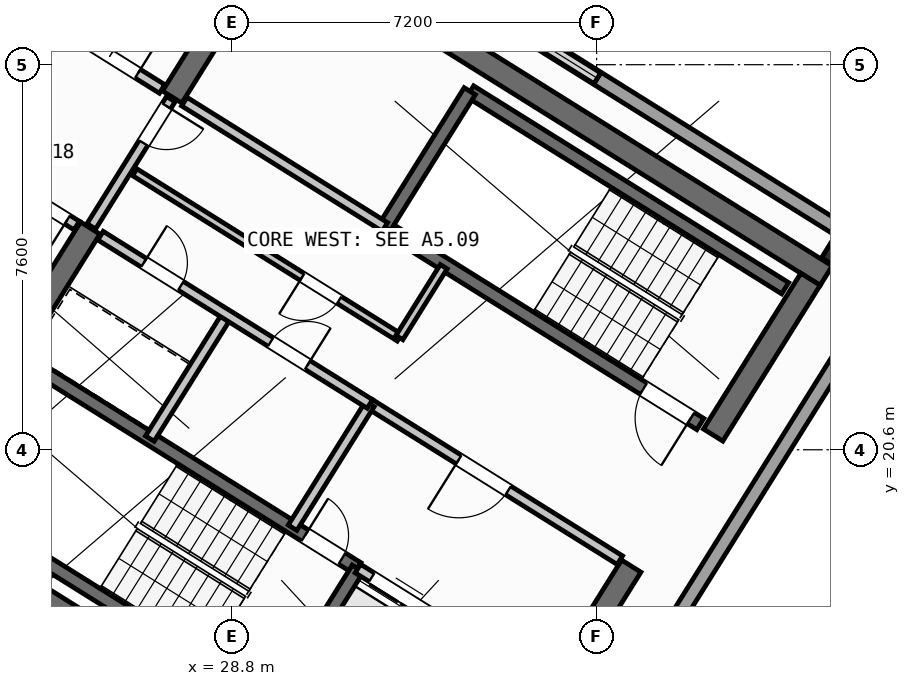
"""IFC4 building model, lengths in metres.
Left out: names, types, materials, properties, quantities, classifications, styles, units other than length and angle.
Written with IfcOpenShell. Run it as: python <this file> out.ifc"""

import sys

from ifc_helpers import new_model, si_unit, direction, frame, frame_2d, origin, origin_2d, place, context, subcontext, project, spatial, rectangle, hollow_rectangle, extrude, source, transform, mapped, element, fill, save


model = new_model("IFC4")
c1 = context("Model", 3, precision=1e-05, world=origin(), true_north=direction((0.0, 1.0)))
c2 = subcontext(c1, "Body", "Model", "MODEL_VIEW")
j1 = project(units=[si_unit("LENGTHUNIT", "METRE"), si_unit("PLANEANGLEUNIT", "RADIAN")], contexts=[c1])
p1 = place(None, origin())
s1 = spatial("IfcSite", under=j1, at=p1, CompositionType="ELEMENT")
p2 = place(p1, origin())
s2 = spatial("IfcBuilding", under=s1, at=p2, CompositionType="ELEMENT")
p3 = place(p2, frame((0.0, 0.0, 309.6)))
s3 = spatial("IfcBuildingStorey", under=s2, at=p3, CompositionType="ELEMENT", Elevation=309.6)
p4 = place(p3, frame((40.531, 24.036, 0.0), z_axis=(0.0, 0.0, 1.0), x_axis=(-0.848048787466, 0.529918157905, 0.0)))
e1 = element("IfcWall", 1, at=p4, inside=s3, PredefinedType="SHEAR", context=c2, shape_type="SweptSolid", body=[
    extrude(rectangle(XDim=13.04, YDim=0.45, at=frame_2d((6.52, 0.0))), origin(), (0.0, 0.0, 1.0), 3.32),
])
p5 = place(p3, frame((33.324, 12.503, 0.0), z_axis=(0.0, 0.0, 1.0), x_axis=(-0.848043529849, 0.529926571782, 0.0)))
e2 = element("IfcWall", 2, at=p5, inside=s3, PredefinedType="SHEAR", context=c2, shape_type="SweptSolid", body=[
    extrude(rectangle(XDim=13.04, YDim=0.45, at=frame_2d((6.52, 0.0))), origin(), (0.0, 0.0, 1.0), 3.32),
])
p6 = place(p3, frame((40.221, 23.965, 0.0), z_axis=(0.0, 0.0, 1.0), x_axis=(-0.529902075036, -0.848058836916, 0.0)))
e3 = element("IfcWall", 3, at=p6, inside=s3, PredefinedType="SHEAR", context=c2, shape_type="SweptSolid", body=[
    extrude(rectangle(XDim=3.625, YDim=0.45, at=frame_2d((1.812, 0.0))), origin(), (0.0, 0.0, 1.0), 3.32),
])
p7 = place(p3, frame((36.683, 18.304, 0.0), z_axis=(0.0, 0.0, 1.0), x_axis=(-0.529904039071, -0.848057609704, 0.0)))
e4 = element("IfcWall", 4, at=p7, inside=s3, PredefinedType="SHEAR", context=c2, shape_type="SweptSolid", body=[
    extrude(rectangle(XDim=6.475, YDim=0.45, at=frame_2d((3.238, 0.0))), origin(), (0.0, 0.0, 1.0), 3.32),
])
p8 = place(p3, frame((29.544, 30.636, 0.0), z_axis=(0.0, 0.0, 1.0), x_axis=(-0.529902075036, -0.848058836916, 0.0)))
e5 = element("IfcWall", 5, at=p8, inside=s3, PredefinedType="SHEAR", context=c2, shape_type="SweptSolid", body=[
    extrude(rectangle(XDim=3.625, YDim=0.45, at=frame_2d((1.812, 0.0))), origin(), (0.0, 0.0, 1.0), 3.32),
])
p9 = place(p3, frame((26.007, 24.976, 0.0), z_axis=(0.0, 0.0, 1.0), x_axis=(-0.529931155655, -0.848040665456, 0.0)))
e6 = element("IfcWall", 6, at=p9, inside=s3, PredefinedType="SHEAR", context=c2, shape_type="SweptSolid", body=[
    extrude(rectangle(XDim=6.475, YDim=0.45, at=frame_2d((3.238, 0.0))), origin(), (0.0, 0.0, 1.0), 3.32),
])
m1 = source(origin(), c2, "Body", "SweptSolid", [
    extrude(hollow_rectangle(XDim=0.5, YDim=0.5, WallThickness=0.025, at=origin_2d()), origin(), (0.0, 0.0, 1.0), 3.6),
])
p10 = place(p3, frame((40.783, 24.469, 0.0), z_axis=(0.0, 0.0, 1.0), x_axis=(-0.848048096156, 0.529919264233, 0.0)))
e7 = element("IfcColumn", 7, at=p10, inside=s3, PredefinedType="COLUMN", context=c2, shape_type="MappedRepresentation", body=[
    mapped(m1, transform((0.0, 0.0, 0.0), scale=1.0)),
])
p11 = place(p3, frame((30.343, 9.236, 0.0), z_axis=(0.0, 0.0, 1.0), x_axis=(-0.848049195283, 0.529917505259, 0.0)))
e8 = element("IfcWall", 8, at=p11, inside=s3, PredefinedType="PARAPET", context=c2, shape_type="SweptSolid", body=[
    extrude(rectangle(XDim=18.056, YDim=0.24, at=frame_2d((9.028, 0.0))), origin(), (0.0, 0.0, 1.0), 1.15),
])
p12 = place(p3, frame((17.111, 18.483, 0.0), z_axis=(0.0, 0.0, 1.0), x_axis=(0.848046596823, -0.529921663661, 0.0)))
e9 = element("IfcWall", 9, at=p12, inside=s3, PredefinedType="PARAPET", context=c2, shape_type="SweptSolid", body=[
    extrude(rectangle(XDim=16.188, YDim=0.24, at=frame_2d((8.094, 0.0))), origin(), (0.0, 0.0, 1.0), 1.15),
])
p13 = place(p3, frame((41.182, 23.031, 0.0), z_axis=(0.0, 0.0, 1.0), x_axis=(-0.529907523796, -0.848055432283, 0.0)))
e10 = element("IfcWall", 10, at=p13, inside=s3, PredefinedType="STANDARD", context=c2, shape_type="SweptSolid", body=[
    extrude(rectangle(XDim=14.884, YDim=0.28, at=frame_2d((7.442, 0.0))), origin(), (0.0, 0.0, 1.0), 3.32),
])
p14 = place(p13, frame((6.817, 0.0, 0.95)))
e11 = element("IfcOpeningElement", 11, at=p14, cuts=e10, PredefinedType="OPENING", context=c2, shape_type="SweptSolid", body=[
    extrude(rectangle(XDim=1.25, YDim=1.4, at=frame_2d((0.625, 0.7))), frame((0.0, 0.15, 0.0), z_axis=(0.0, -1.0, 0.0), x_axis=(1.0, 0.0, 0.0)), (0.0, 0.0, 1.0), 0.3),
])
p15 = place(p3, frame((31.34, 9.957, 0.0), z_axis=(0.0, 0.0, 1.0), x_axis=(-0.848053214258, 0.52991107347, 0.0)))
e12 = element("IfcWall", 12, at=p15, inside=s3, PredefinedType="STANDARD", context=c2, shape_type="SweptSolid", body=[
    extrude(rectangle(XDim=16.984, YDim=0.28, at=frame_2d((8.492, 0.0))), origin(), (0.0, 0.0, 1.0), 3.32),
])
p16 = place(p15, frame((7.009, 0.0, 0.95)))
e13 = element("IfcOpeningElement", 13, at=p16, cuts=e12, PredefinedType="OPENING", context=c2, shape_type="SweptSolid", body=[
    extrude(rectangle(XDim=1.25, YDim=1.4, at=frame_2d((0.625, 0.7))), frame((0.0, 0.15, 0.0), z_axis=(0.0, -1.0, 0.0), x_axis=(1.0, 0.0, 0.0)), (0.0, 0.0, 1.0), 0.3),
])
p17 = place(p3, frame((26.327, 33.985, 0.0), z_axis=(0.0, 0.0, 1.0), x_axis=(0.848042717617, -0.529927871598, 0.0)))
e14 = element("IfcWall", 14, at=p17, inside=s3, PredefinedType="STANDARD", context=c2, shape_type="SweptSolid", body=[
    extrude(rectangle(XDim=16.984, YDim=0.28, at=frame_2d((8.492, 0.0))), origin(), (0.0, 0.0, 1.0), 3.32),
])
p18 = place(p17, frame((1.551, 0.0, 0.95)))
e15 = element("IfcOpeningElement", 15, at=p18, cuts=e14, PredefinedType="OPENING", context=c2, shape_type="SweptSolid", body=[
    extrude(rectangle(XDim=1.25, YDim=1.4, at=frame_2d((0.625, 0.7))), frame((0.0, 0.15, 0.0), z_axis=(0.0, -1.0, 0.0), x_axis=(1.0, 0.0, 0.0)), (0.0, 0.0, 1.0), 0.3),
])
p19 = place(p17, frame((10.193, 0.0, 0.95)))
e16 = element("IfcOpeningElement", 16, at=p19, cuts=e14, PredefinedType="OPENING", context=c2, shape_type="SweptSolid", body=[
    extrude(rectangle(XDim=1.25, YDim=1.4, at=frame_2d((0.625, 0.7))), frame((0.0, 0.15, 0.0), z_axis=(0.0, -1.0, 0.0), x_axis=(1.0, 0.0, 0.0)), (0.0, 0.0, 1.0), 0.3),
])
p20 = place(p3, frame((29.605, 15.581, 0.0), z_axis=(0.0, 0.0, 1.0), x_axis=(-0.848036911448, 0.529937163087, 0.0)))
e17 = element("IfcWall", 17, at=p20, inside=s3, PredefinedType="SHEAR", context=c2, shape_type="SweptSolid", body=[
    extrude(rectangle(XDim=7.46, YDim=0.26, at=frame_2d((3.73, 0.0))), origin(), (0.0, 0.0, 1.0), 3.32),
])
p21 = place(p3, frame((31.28, 18.261, 0.0), z_axis=(0.0, 0.0, 1.0), x_axis=(-0.848051618787, 0.529913626805, 0.0)))
e18 = element("IfcWall", 18, at=p21, inside=s3, PredefinedType="SHEAR", context=c2, shape_type="SweptSolid", body=[
    extrude(rectangle(XDim=7.46, YDim=0.26, at=frame_2d((3.73, 0.0))), origin(), (0.0, 0.0, 1.0), 3.32),
])
p22 = place(p21, frame((0.36, 0.0, 0.0)))
e19 = element("IfcOpeningElement", 19, at=p22, cuts=e18, PredefinedType="OPENING", context=c2, shape_type="SweptSolid", body=[
    extrude(rectangle(XDim=0.86, YDim=2.05, at=frame_2d((0.43, 1.025))), frame((0.0, 0.14, 0.0), z_axis=(0.0, -1.0, 0.0), x_axis=(1.0, 0.0, 0.0)), (0.0, 0.0, 1.0), 0.28),
])
p23 = place(p3, frame((31.288, 18.256, 0.0), z_axis=(0.0, 0.0, 1.0), x_axis=(-0.529943379326, -0.848033026897, 0.0)))
e20 = element("IfcWall", 20, at=p23, inside=s3, PredefinedType="SHEAR", context=c2, shape_type="SweptSolid", body=[
    extrude(rectangle(XDim=3.16, YDim=0.26, at=frame_2d((1.58, 0.0))), origin(), (0.0, 0.0, 1.0), 3.32),
])
p24 = place(p3, frame((39.721, 23.788, 0.0), z_axis=(0.0, 0.0, 1.0), x_axis=(-0.848054434086, 0.529909121291, 0.0)))
e21 = element("IfcWall", 21, at=p24, inside=s3, PredefinedType="SHEAR", context=c2, shape_type="SweptSolid", body=[
    extrude(rectangle(XDim=7.33, YDim=0.26, at=frame_2d((3.665, 0.0))), origin(), (0.0, 0.0, 1.0), 3.32),
])
p25 = place(p3, frame((38.046, 21.108, 0.0), z_axis=(0.0, 0.0, 1.0), x_axis=(-0.848054434086, 0.529909121291, 0.0)))
e22 = element("IfcWall", 22, at=p25, inside=s3, PredefinedType="SHEAR", context=c2, shape_type="SweptSolid", body=[
    extrude(rectangle(XDim=7.33, YDim=0.26, at=frame_2d((3.665, 0.0))), origin(), (0.0, 0.0, 1.0), 3.32),
])
p26 = place(p25, frame((0.22, 0.0, 0.0)))
e23 = element("IfcOpeningElement", 23, at=p26, cuts=e22, PredefinedType="OPENING", context=c2, shape_type="SweptSolid", body=[
    extrude(rectangle(XDim=1.1, YDim=2.1, at=frame_2d((0.55, 1.05))), frame((0.0, 0.14, 0.0), z_axis=(0.0, -1.0, 0.0), x_axis=(1.0, 0.0, 0.0)), (0.0, 0.0, 1.0), 0.28),
])
p27 = place(p3, frame((33.496, 27.677, 0.0), z_axis=(0.0, 0.0, 1.0), x_axis=(-0.529908658664, -0.84805472316, 0.0)))
e24 = element("IfcWall", 24, at=p27, inside=s3, PredefinedType="SHEAR", context=c2, shape_type="SweptSolid", body=[
    extrude(rectangle(XDim=3.16, YDim=0.26, at=frame_2d((1.58, 0.0))), origin(), (0.0, 0.0, 1.0), 3.32),
])
p28 = place(p3, frame((34.933, 15.978, 0.0), z_axis=(0.0, 0.0, 1.0), x_axis=(-0.848055739377, 0.529907032327, 0.0)))
e25 = element("IfcWall", 25, at=p28, inside=s3, PredefinedType="STANDARD", context=c2, shape_type="SweptSolid", body=[
    extrude(rectangle(XDim=4.298, YDim=0.2, at=frame_2d((2.149, 0.0))), origin(), (0.0, 0.0, 1.0), 3.31),
])
p29 = place(p28, frame((0.448, 0.0, 0.0)))
e26 = element("IfcOpeningElement", 26, at=p29, cuts=e25, PredefinedType="OPENING", context=c2, shape_type="SweptSolid", body=[
    extrude(rectangle(XDim=1.3, YDim=2.2, at=frame_2d((0.65, 1.1))), frame((0.0, 0.11, 0.0), z_axis=(0.0, -1.0, 0.0), x_axis=(1.0, 0.0, 0.0)), (0.0, 0.0, 1.0), 0.22),
])
p30 = place(p28, frame((2.523, 0.0, 0.0)))
e27 = element("IfcOpeningElement", 27, at=p30, cuts=e25, PredefinedType="OPENING", context=c2, shape_type="SweptSolid", body=[
    extrude(rectangle(XDim=1.45, YDim=2.25, at=frame_2d((0.725, 1.125))), frame((0.0, 0.11, 0.0), z_axis=(0.0, -1.0, 0.0), x_axis=(1.0, 0.0, 0.0)), (0.0, 0.0, 1.0), 0.22),
])
p31 = place(p3, frame((36.459, 18.421, 0.0), z_axis=(0.0, 0.0, 1.0), x_axis=(-0.848059591691, 0.529900867089, 0.0)))
e28 = element("IfcWall", 28, at=p31, inside=s3, PredefinedType="STANDARD", context=c2, shape_type="SweptSolid", body=[
    extrude(rectangle(XDim=5.818, YDim=0.2, at=frame_2d((2.909, 0.0))), origin(), (0.0, 0.0, 1.0), 3.31),
])
p32 = place(p31, frame((2.598, 0.0, 0.0)))
e29 = element("IfcOpeningElement", 29, at=p32, cuts=e28, PredefinedType="OPENING", context=c2, shape_type="SweptSolid", body=[
    extrude(rectangle(XDim=1.15, YDim=2.1, at=frame_2d((0.575, 1.05))), frame((0.0, 0.11, 0.0), z_axis=(0.0, -1.0, 0.0), x_axis=(1.0, 0.0, 0.0)), (0.0, 0.0, 1.0), 0.22),
])
p33 = place(p3, frame((31.822, 24.998, 0.0), z_axis=(0.0, 0.0, 1.0), x_axis=(-0.848054125777, 0.529909614701, 0.0)))
e30 = element("IfcWall", 30, at=p33, inside=s3, PredefinedType="STANDARD", context=c2, shape_type="SweptSolid", body=[
    extrude(rectangle(XDim=4.668, YDim=0.2, at=frame_2d((2.334, 0.0))), origin(), (0.0, 0.0, 1.0), 3.31),
])
p34 = place(p3, frame((32.108, 22.814, 0.0), z_axis=(0.0, 0.0, 1.0), x_axis=(-0.848047283855, 0.529920564185, 0.0)))
e31 = element("IfcWall", 31, at=p34, inside=s3, PredefinedType="PARTITIONING", context=c2, shape_type="SweptSolid", body=[
    extrude(rectangle(XDim=6.16, YDim=0.16, at=frame_2d((3.08, 0.0))), origin(), (0.0, 0.0, 1.0), 3.31),
])
p35 = place(p34, frame((1.4, 0.0, 0.0)))
e32 = element("IfcOpeningElement", 32, at=p35, cuts=e31, PredefinedType="OPENING", context=c2, shape_type="SweptSolid", body=[
    extrude(rectangle(XDim=0.86, YDim=2.05, at=frame_2d((0.43, 1.025))), frame((0.0, 0.09, 0.0), z_axis=(0.0, -1.0, 0.0), x_axis=(1.0, 0.0, 0.0)), (0.0, 0.0, 1.0), 0.18),
])
p36 = place(p3, frame((32.982, 24.213, 0.0), z_axis=(0.0, 0.0, 1.0), x_axis=(-0.529839334948, -0.84809803628, 0.0)))
e33 = element("IfcWall", 33, at=p36, inside=s3, PredefinedType="PARTITIONING", context=c2, shape_type="SweptSolid", body=[
    extrude(rectangle(XDim=1.65, YDim=0.16, at=frame_2d((0.825, 0.0))), origin(), (0.0, 0.0, 1.0), 3.31),
])
for number, where, z_axis, x_axis in (
    (34, (31.525, 21.504, 0.0), (0.0, 0.0, 1.0), (-0.53, -0.848, 0.0)),
    (35, (28.71, 23.263, 0.0), (0.0, 0.0, 1.0), (-0.53, -0.848, 0.0)),
):
    element("IfcWall", number, at=place(p3, frame(where, z_axis=z_axis, x_axis=x_axis)), inside=s3, PredefinedType="STANDARD", context=c2, shape_type="SweptSolid", body=[
        extrude(rectangle(XDim=2.88, YDim=0.2, at=frame_2d((1.44, 0.0))), origin(), (0.0, 0.0, 1.0), 3.31),
    ])
p37 = place(p3, frame((31.525, 21.504, 0.0), z_axis=(0.0, 0.0, 1.0), x_axis=(-0.848042066329, 0.529928913853, 0.0)))
e36 = element("IfcWall", 36, at=p37, inside=s3, PredefinedType="STANDARD", context=c2, shape_type="SweptSolid", body=[
    extrude(rectangle(XDim=6.268, YDim=0.2, at=frame_2d((3.134, 0.0))), origin(), (0.0, 0.0, 1.0), 3.31),
])
p38 = place(p37, frame((4.4, 0.0, 0.0)))
e37 = element("IfcOpeningElement", 37, at=p38, cuts=e36, PredefinedType="OPENING", context=c2, shape_type="SweptSolid", body=[
    extrude(rectangle(XDim=0.86, YDim=2.05, at=frame_2d((0.43, 1.025))), frame((0.0, 0.11, 0.0), z_axis=(0.0, -1.0, 0.0), x_axis=(1.0, 0.0, 0.0)), (0.0, 0.0, 1.0), 0.22),
])
p39 = place(p37, frame((1.45, 0.0, 0.0)))
e38 = element("IfcOpeningElement", 38, at=p39, cuts=e36, PredefinedType="OPENING", context=c2, shape_type="SweptSolid", body=[
    extrude(rectangle(XDim=0.86, YDim=2.05, at=frame_2d((0.43, 1.025))), frame((0.0, 0.11, 0.0), z_axis=(0.0, -1.0, 0.0), x_axis=(1.0, 0.0, 0.0)), (0.0, 0.0, 1.0), 0.22),
])
p40 = place(p3, frame((27.596, 27.52, 0.0), z_axis=(0.0, 0.0, 1.0), x_axis=(-0.529865479138, -0.848081702443, 0.0)))
e39 = element("IfcWall", 39, at=p40, inside=s3, PredefinedType="STANDARD", context=c2, shape_type="SweptSolid", body=[
    extrude(rectangle(XDim=2.96, YDim=0.2, at=frame_2d((1.48, 0.0))), origin(), (0.0, 0.0, 1.0), 3.31),
])
p41 = place(p40, frame((0.16, 0.0, 0.0)))
e40 = element("IfcOpeningElement", 40, at=p41, cuts=e39, PredefinedType="OPENING", context=c2, shape_type="SweptSolid", body=[
    extrude(rectangle(XDim=0.86, YDim=2.05, at=frame_2d((0.43, 1.025))), frame((0.0, 0.11, 0.0), z_axis=(0.0, -1.0, 0.0), x_axis=(1.0, 0.0, 0.0)), (0.0, 0.0, 1.0), 0.22),
])
p42 = place(p3, frame((25.74, 25.025, 0.0), z_axis=(0.0, 0.0, 1.0), x_axis=(-0.848053858841, 0.529910041898, 0.0)))
e41 = element("IfcWall", 41, at=p42, inside=s3, PredefinedType="STANDARD", context=c2, shape_type="SweptSolid", body=[
    extrude(rectangle(XDim=5.678, YDim=0.2, at=frame_2d((2.839, 0.0))), origin(), (0.0, 0.0, 1.0), 3.31),
])
p43 = place(p42, frame((0.218, 0.0, 0.0)))
e42 = element("IfcOpeningElement", 42, at=p43, cuts=e41, PredefinedType="OPENING", context=c2, shape_type="SweptSolid", body=[
    extrude(rectangle(XDim=1.3, YDim=2.15, at=frame_2d((0.65, 1.075))), frame((0.0, 0.11, 0.0), z_axis=(0.0, -1.0, 0.0), x_axis=(1.0, 0.0, 0.0)), (0.0, 0.0, 1.0), 0.22),
])
p44 = place(p42, frame((3.003, 0.0, 0.0)))
e43 = element("IfcOpeningElement", 43, at=p44, cuts=e41, PredefinedType="OPENING", context=c2, shape_type="SweptSolid", body=[
    extrude(rectangle(XDim=1.3, YDim=2.15, at=frame_2d((0.65, 1.075))), frame((0.0, 0.11, 0.0), z_axis=(0.0, -1.0, 0.0), x_axis=(1.0, 0.0, 0.0)), (0.0, 0.0, 1.0), 0.22),
])
p45 = place(p3, frame((27.425, 27.721, 0.0), z_axis=(0.0, 0.0, 1.0), x_axis=(-0.848053858841, 0.529910041898, 0.0)))
e44 = element("IfcWall", 44, at=p45, inside=s3, PredefinedType="STANDARD", context=c2, shape_type="SweptSolid", body=[
    extrude(rectangle(XDim=5.678, YDim=0.2, at=frame_2d((2.839, 0.0))), origin(), (0.0, 0.0, 1.0), 3.31),
])
p46 = place(p45, frame((0.568, 0.0, 0.0)))
e45 = element("IfcOpeningElement", 45, at=p46, cuts=e44, PredefinedType="OPENING", context=c2, shape_type="SweptSolid", body=[
    extrude(rectangle(XDim=1.3, YDim=2.15, at=frame_2d((0.65, 1.075))), frame((0.0, 0.11, 0.0), z_axis=(0.0, -1.0, 0.0), x_axis=(1.0, 0.0, 0.0)), (0.0, 0.0, 1.0), 0.22),
])
m2 = source(origin(), c2, "Body", "SweptSolid", [
    extrude(rectangle(XDim=1.25, YDim=1.4, at=frame_2d((0.625, 0.7))), frame((0.0, 0.03, 0.0), z_axis=(0.0, -1.0, 0.0), x_axis=(1.0, 0.0, 0.0)), (0.0, 0.0, 1.0), 0.06),
])
p47 = place(p19, origin())
e46 = element("IfcWindow", 46, at=p47, inside=s3, PartitioningType="SINGLE_PANEL", PredefinedType="WINDOW", context=c2, shape_type="MappedRepresentation", body=[
    mapped(m2, transform((0.0, 0.0, 0.0), scale=1.0)),
])
fill(e16, e46)
m3 = source(origin(), c2, "Body", "SweptSolid", [
    extrude(rectangle(XDim=0.86, YDim=2.05, at=frame_2d((0.43, 1.025))), frame((0.0, 0.025, 0.0), z_axis=(0.0, -1.0, 0.0), x_axis=(1.0, 0.0, 0.0)), (0.0, 0.0, 1.0), 0.05),
])
p48 = place(p22, frame((0.86, 0.0, 0.0), z_axis=(0.0, 0.0, 1.0), x_axis=(-1.0, 0.0, 0.0)))
e47 = element("IfcDoor", 47, at=p48, inside=s3, OperationType="SINGLE_SWING_LEFT", PredefinedType="DOOR", context=c2, shape_type="MappedRepresentation", body=[
    mapped(m3, transform((0.0, 0.0, 0.0), scale=1.0)),
])
fill(e19, e47)
p49 = place(p35, origin())
e48 = element("IfcDoor", 48, at=p49, inside=s3, OperationType="SINGLE_SWING_RIGHT", PredefinedType="DOOR", context=c2, shape_type="MappedRepresentation", body=[
    mapped(m3, transform((0.0, 0.0, 0.0), scale=1.0)),
])
fill(e32, e48)
m4 = source(origin(), c2, "Body", "SweptSolid", [
    extrude(rectangle(XDim=1.1, YDim=2.1, at=frame_2d((0.55, 1.05))), frame((0.0, 0.025, 0.0), z_axis=(0.0, -1.0, 0.0), x_axis=(1.0, 0.0, 0.0)), (0.0, 0.0, 1.0), 0.05),
])
p50 = place(p26, origin())
e49 = element("IfcDoor", 49, at=p50, inside=s3, OperationType="SINGLE_SWING_LEFT", PredefinedType="DOOR", context=c2, shape_type="MappedRepresentation", body=[
    mapped(m4, transform((0.0, 0.0, 0.0), scale=1.0)),
])
fill(e23, e49)
m5 = source(origin(), c2, "Body", "SweptSolid", [
    extrude(rectangle(XDim=1.15, YDim=2.1, at=frame_2d((0.575, 1.05))), frame((0.0, 0.025, 0.0), z_axis=(0.0, -1.0, 0.0), x_axis=(1.0, 0.0, 0.0)), (0.0, 0.0, 1.0), 0.05),
])
p51 = place(p32, origin())
e50 = element("IfcDoor", 50, at=p51, inside=s3, OperationType="SINGLE_SWING_RIGHT", PredefinedType="DOOR", context=c2, shape_type="MappedRepresentation", body=[
    mapped(m5, transform((0.0, 0.0, 0.0), scale=1.0)),
])
fill(e29, e50)
m6 = source(origin(), c2, "Body", "SweptSolid", [
    extrude(rectangle(XDim=1.45, YDim=2.25, at=frame_2d((0.725, 1.125))), frame((0.0, 0.025, 0.0), z_axis=(0.0, -1.0, 0.0), x_axis=(1.0, 0.0, 0.0)), (0.0, 0.0, 1.0), 0.05),
])
p52 = place(p30, origin())
e51 = element("IfcDoor", 51, at=p52, inside=s3, OperationType="DOUBLE_DOOR_SLIDING", PredefinedType="DOOR", context=c2, shape_type="MappedRepresentation", body=[
    mapped(m6, transform((0.0, 0.0, 0.0), scale=1.0)),
])
fill(e27, e51)
p53 = place(p38, frame((0.86, 0.0, 0.0), z_axis=(0.0, 0.0, 1.0), x_axis=(-1.0, 0.0, 0.0)))
e52 = element("IfcDoor", 52, at=p53, inside=s3, OperationType="SINGLE_SWING_LEFT", PredefinedType="DOOR", context=c2, shape_type="MappedRepresentation", body=[
    mapped(m3, transform((0.0, 0.0, 0.0), scale=1.0)),
])
fill(e37, e52)
p54 = place(p39, frame((0.86, 0.0, 0.0), z_axis=(0.0, 0.0, 1.0), x_axis=(-1.0, 0.0, 0.0)))
e53 = element("IfcDoor", 53, at=p54, inside=s3, OperationType="SINGLE_SWING_RIGHT", PredefinedType="DOOR", context=c2, shape_type="MappedRepresentation", body=[
    mapped(m3, transform((0.0, 0.0, 0.0), scale=1.0)),
])
fill(e38, e53)
p55 = place(p41, origin())
e54 = element("IfcDoor", 54, at=p55, inside=s3, OperationType="SINGLE_SWING_LEFT", PredefinedType="DOOR", context=c2, shape_type="MappedRepresentation", body=[
    mapped(m3, transform((0.0, 0.0, 0.0), scale=1.0)),
])
fill(e40, e54)
m7 = source(origin(), c2, "Body", "SweptSolid", [
    extrude(rectangle(XDim=1.3, YDim=2.15, at=frame_2d((0.65, 1.075))), frame((0.0, 0.025, 0.0), z_axis=(0.0, -1.0, 0.0), x_axis=(1.0, 0.0, 0.0)), (0.0, 0.0, 1.0), 0.05),
])
p56 = place(p43, origin())
e55 = element("IfcDoor", 55, at=p56, inside=s3, OperationType="DOUBLE_DOOR_SINGLE_SWING", PredefinedType="DOOR", context=c2, shape_type="MappedRepresentation", body=[
    mapped(m7, transform((0.0, 0.0, 0.0), scale=1.0)),
])
fill(e42, e55)
p57 = place(p46, frame((1.3, 0.0, 0.0), z_axis=(0.0, 0.0, 1.0), x_axis=(-1.0, 0.0, 0.0)))
e56 = element("IfcDoor", 56, at=p57, inside=s3, OperationType="DOUBLE_DOOR_SINGLE_SWING", PredefinedType="DOOR", context=c2, shape_type="MappedRepresentation", body=[
    mapped(m7, transform((0.0, 0.0, 0.0), scale=1.0)),
])
fill(e45, e56)
save(model, sys.argv[1])
